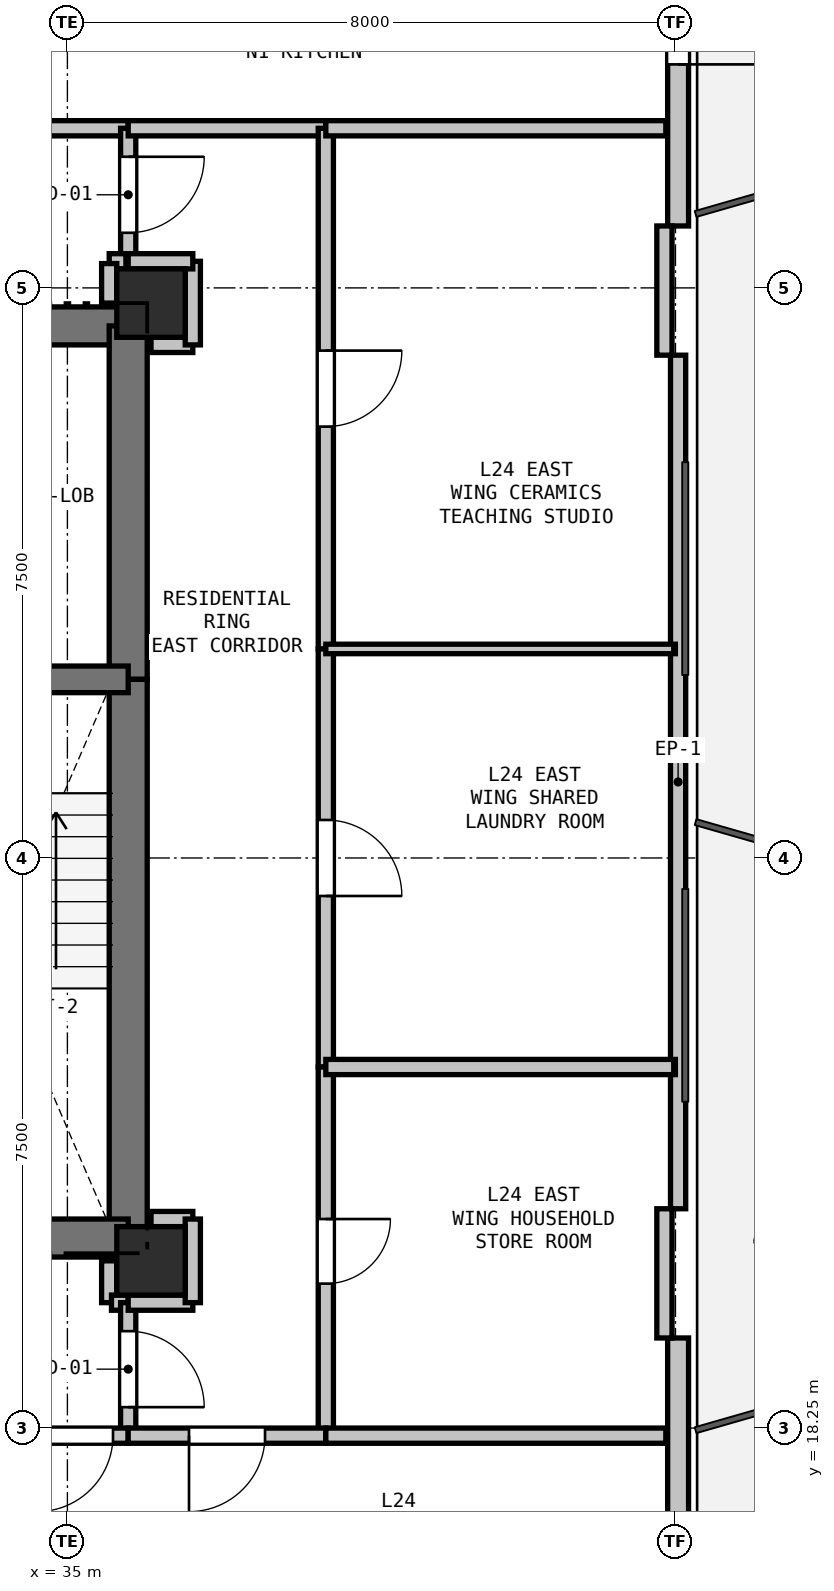
"""IFC4 building model, lengths in metres.
Left out: names, types, materials, properties, quantities, classifications, styles, units other than length and angle.
Written with IfcOpenShell. Run it as: python <this file> out.ifc"""

import sys

from ifc_helpers import new_model, si_unit, direction, frame, frame_2d, origin, origin_2d, place, context, subcontext, project, spatial, rectangle, extrude, element, fill, save


model = new_model("IFC4")
c1 = context("Model", 3, precision=1e-05, world=origin(), true_north=direction((0.0, 1.0)))
c2 = subcontext(c1, "Body", "Model", "MODEL_VIEW")
j1 = project(units=[si_unit("LENGTHUNIT", "METRE"), si_unit("PLANEANGLEUNIT", "RADIAN")], contexts=[c1])
p1 = place(None, origin())
s1 = spatial("IfcSite", under=j1, at=p1, CompositionType="ELEMENT")
p2 = place(p1, origin())
s2 = spatial("IfcBuilding", under=s1, at=p2, CompositionType="ELEMENT")
p3 = place(p2, frame((0.0, 0.0, 90.0)))
s3 = spatial("IfcBuildingStorey", under=s2, at=p3, CompositionType="ELEMENT", Elevation=90.0)
for number, where, z_axis, x_axis in (
    (1, (36.1, 33.05, 0.0), (0.0, 0.0, 1.0), (1.0, 0.0, 0.0)),
    (2, (36.1, 20.45, 0.0), (0.0, 0.0, 1.0), (1.0, 0.0, 0.0)),
):
    element("IfcColumn", number, at=place(p3, frame(where, z_axis=z_axis, x_axis=x_axis)), inside=s3, PredefinedType="COLUMN", context=c2, shape_type="SweptSolid", body=[
        extrude(rectangle(XDim=0.9, YDim=0.9, at=origin_2d()), origin(), (0.0, 0.0, 1.0), 3.3),
    ])
p4 = place(p3, frame((43.035, 45.994, 0.0), z_axis=(0.0, 0.0, 1.0), x_axis=(0.0, -1.0, 0.0)))
e3 = element("IfcWall", 3, at=p4, inside=s3, PredefinedType="SOLIDWALL", context=c2, shape_type="SweptSolid", body=[
    extrude(rectangle(XDim=11.93, YDim=0.275, at=frame_2d((5.965, 0.0))), origin(), (0.0, 0.0, 1.0), 2.67),
])
p5 = place(p4, frame((8.704, 0.0, 0.0)))
e4 = element("IfcOpeningElement", 4, at=p5, cuts=e3, PredefinedType="OPENING", context=c2, shape_type="SweptSolid", body=[
    extrude(rectangle(XDim=1.1, YDim=2.1, at=frame_2d((0.55, 1.05))), frame((0.0, 0.147, 0.0), z_axis=(0.0, -1.0, 0.0), x_axis=(1.0, 0.0, 0.0)), (0.0, 0.0, 1.0), 0.295),
])
p6 = place(p3, frame((43.035, 32.365, 0.0), z_axis=(0.0, 0.0, 1.0), x_axis=(0.0, -1.0, 0.0)))
e5 = element("IfcWall", 5, at=p6, inside=s3, PredefinedType="PARAPET", context=c2, shape_type="SweptSolid", body=[
    extrude(rectangle(XDim=11.229, YDim=0.2, at=frame_2d((5.615, 0.0))), origin(), (0.0, 0.0, 1.0), 0.2),
])
p7 = place(p3, frame((43.035, 19.435, 0.0), z_axis=(0.0, 0.0, 1.0), x_axis=(0.0, -1.0, 0.0)))
e6 = element("IfcWall", 6, at=p7, inside=s3, PredefinedType="SOLIDWALL", context=c2, shape_type="SweptSolid", body=[
    extrude(rectangle(XDim=11.93, YDim=0.275, at=frame_2d((5.965, 0.0))), origin(), (0.0, 0.0, 1.0), 2.67),
])
p8 = place(p7, frame((9.726, 0.0, 0.9)))
e7 = element("IfcOpeningElement", 7, at=p8, cuts=e6, PredefinedType="OPENING", context=c2, shape_type="SweptSolid", body=[
    extrude(rectangle(XDim=1.2, YDim=1.4, at=frame_2d((0.6, 0.7))), frame((0.0, 0.147, 0.0), z_axis=(0.0, -1.0, 0.0), x_axis=(1.0, 0.0, 0.0)), (0.0, 0.0, 1.0), 0.295),
])
for number, where, z_axis, x_axis in (
    (8, (42.854, 34.065, 0.0), (0.0, 0.0, 1.0), (0.0, -1.0, 0.0)),
    (9, (42.854, 21.135, 0.0), (0.0, 0.0, 1.0), (0.0, -1.0, 0.0)),
):
    element("IfcWall", number, at=place(p3, frame(where, z_axis=z_axis, x_axis=x_axis)), inside=s3, PredefinedType="PARAPET", context=c2, shape_type="SweptSolid", body=[
        extrude(rectangle(XDim=1.7, YDim=0.2, at=frame_2d((0.85, 0.0))), origin(), (0.0, 0.0, 1.0), 2.67),
    ])
p9 = place(p3, frame((32.35, 32.75, 0.0), z_axis=(0.0, 0.0, 1.0), x_axis=(1.0, 0.0, 0.0)))
e10 = element("IfcWall", 10, at=p9, inside=s3, PredefinedType="SHEAR", context=c2, shape_type="SweptSolid", body=[
    extrude(rectangle(XDim=3.45, YDim=0.5, at=frame_2d((1.725, 0.0))), origin(), (0.0, 0.0, 1.0), 3.05),
])
p10 = place(p9, frame((0.65, 0.0, 0.0)))
e11 = element("IfcOpeningElement", 11, at=p10, cuts=e10, PredefinedType="OPENING", context=c2, shape_type="SweptSolid", body=[
    extrude(rectangle(XDim=1.15, YDim=2.15, at=frame_2d((0.575, 1.075))), frame((0.0, 0.26, 0.0), z_axis=(0.0, -1.0, 0.0), x_axis=(1.0, 0.0, 0.0)), (0.0, 0.0, 1.0), 0.52),
])
p11 = place(p3, frame((35.8, 32.75, 0.0), z_axis=(0.0, 0.0, 1.0), x_axis=(0.0, -1.0, 0.0)))
e12 = element("IfcWall", 12, at=p11, inside=s3, PredefinedType="SHEAR", context=c2, shape_type="SweptSolid", body=[
    extrude(rectangle(XDim=4.65, YDim=0.5, at=frame_2d((2.325, 0.0))), origin(), (0.0, 0.0, 1.0), 3.05),
])
p12 = place(p3, frame((35.8, 28.1, 0.0), z_axis=(0.0, 0.0, 1.0), x_axis=(0.0, -1.0, 0.0)))
e13 = element("IfcWall", 13, at=p12, inside=s3, PredefinedType="SHEAR", context=c2, shape_type="SweptSolid", body=[
    extrude(rectangle(XDim=7.35, YDim=0.5, at=frame_2d((3.675, 0.0))), origin(), (0.0, 0.0, 1.0), 3.05),
])
p13 = place(p3, frame((35.8, 20.75, 0.0), z_axis=(0.0, 0.0, 1.0), x_axis=(-1.0, 0.0, 0.0)))
e14 = element("IfcWall", 14, at=p13, inside=s3, PredefinedType="SHEAR", context=c2, shape_type="SweptSolid", body=[
    extrude(rectangle(XDim=3.45, YDim=0.5, at=frame_2d((1.725, 0.0))), origin(), (0.0, 0.0, 1.0), 3.05),
])
p14 = place(p3, frame((32.35, 28.1, 0.0), z_axis=(0.0, 0.0, 1.0), x_axis=(1.0, 0.0, 0.0)))
e15 = element("IfcWall", 15, at=p14, inside=s3, PredefinedType="SHEAR", context=c2, shape_type="SweptSolid", body=[
    extrude(rectangle(XDim=3.45, YDim=0.35, at=frame_2d((1.725, 0.0))), origin(), (0.0, 0.0, 1.0), 3.05),
])
p15 = place(p14, frame((1.15, 0.0, 0.0)))
e16 = element("IfcOpeningElement", 16, at=p15, cuts=e15, PredefinedType="OPENING", context=c2, shape_type="SweptSolid", body=[
    extrude(rectangle(XDim=1.15, YDim=2.15, at=frame_2d((0.575, 1.075))), frame((0.0, 0.185, 0.0), z_axis=(0.0, -1.0, 0.0), x_axis=(1.0, 0.0, 0.0)), (0.0, 0.0, 1.0), 0.37),
])
p16 = place(p3, frame((35.55, 20.45, 0.0), z_axis=(0.0, 0.0, 1.0), x_axis=(0.0, -1.0, 0.0)))
e17 = element("IfcWall", 17, at=p16, inside=s3, PredefinedType="PARTITIONING", context=c2, shape_type="SweptSolid", body=[
    extrude(rectangle(XDim=0.55, YDim=0.2, at=frame_2d((0.275, 0.0))), origin(), (0.0, 0.0, 1.0), 2.498),
])
p17 = place(p3, frame((35.58, 19.9, 0.0), z_axis=(0.0, 0.0, 1.0), x_axis=(1.0, 0.0, 0.0)))
e18 = element("IfcWall", 18, at=p17, inside=s3, PredefinedType="PARTITIONING", context=c2, shape_type="SweptSolid", body=[
    extrude(rectangle(XDim=0.22, YDim=0.2, at=frame_2d((0.11, 0.0))), origin(), (0.0, 0.0, 1.0), 3.05),
])
p18 = place(p3, frame((35.8, 19.9, 0.0), z_axis=(0.0, 0.0, 1.0), x_axis=(0.0, -1.0, 0.0)))
e19 = element("IfcWall", 19, at=p18, inside=s3, PredefinedType="PARTITIONING", context=c2, shape_type="SweptSolid", body=[
    extrude(rectangle(XDim=1.75, YDim=0.2, at=frame_2d((0.875, 0.0))), origin(), (0.0, 0.0, 1.0), 3.05),
])
p19 = place(p18, frame((0.375, 0.0, 0.0)))
e20 = element("IfcOpeningElement", 20, at=p19, cuts=e19, PredefinedType="OPENING", context=c2, shape_type="SweptSolid", body=[
    extrude(rectangle(XDim=1.0, YDim=2.15, at=frame_2d((0.5, 1.075))), frame((0.0, 0.11, 0.0), z_axis=(0.0, -1.0, 0.0), x_axis=(1.0, 0.0, 0.0)), (0.0, 0.0, 1.0), 0.22),
])
p20 = place(p3, frame((35.8, 18.15, 0.0), z_axis=(0.0, 0.0, 1.0), x_axis=(-1.0, 0.0, 0.0)))
e21 = element("IfcWall", 21, at=p20, inside=s3, PredefinedType="PARTITIONING", context=c2, shape_type="SweptSolid", body=[
    extrude(rectangle(XDim=1.4, YDim=0.2, at=frame_2d((0.7, 0.0))), origin(), (0.0, 0.0, 1.0), 3.05),
])
p21 = place(p20, frame((0.2, 0.0, 0.0)))
e22 = element("IfcOpeningElement", 22, at=p21, cuts=e21, PredefinedType="OPENING", context=c2, shape_type="SweptSolid", body=[
    extrude(rectangle(XDim=1.0, YDim=2.15, at=frame_2d((0.5, 1.075))), frame((0.0, 0.11, 0.0), z_axis=(0.0, -1.0, 0.0), x_axis=(1.0, 0.0, 0.0)), (0.0, 0.0, 1.0), 0.22),
])
p22 = place(p3, frame((33.2, 35.35, 0.0), z_axis=(0.0, 0.0, 1.0), x_axis=(1.0, 0.0, 0.0)))
e23 = element("IfcWall", 23, at=p22, inside=s3, PredefinedType="PARTITIONING", context=c2, shape_type="SweptSolid", body=[
    extrude(rectangle(XDim=2.6, YDim=0.2, at=frame_2d((1.3, 0.0))), origin(), (0.0, 0.0, 1.0), 3.05),
])
p23 = place(p3, frame((35.8, 35.35, 0.0), z_axis=(0.0, 0.0, 1.0), x_axis=(0.0, -1.0, 0.0)))
e24 = element("IfcWall", 24, at=p23, inside=s3, PredefinedType="PARTITIONING", context=c2, shape_type="SweptSolid", body=[
    extrude(rectangle(XDim=1.75, YDim=0.2, at=frame_2d((0.875, 0.0))), origin(), (0.0, 0.0, 1.0), 3.05),
])
p24 = place(p23, frame((0.375, 0.0, 0.0)))
e25 = element("IfcOpeningElement", 25, at=p24, cuts=e24, PredefinedType="OPENING", context=c2, shape_type="SweptSolid", body=[
    extrude(rectangle(XDim=1.0, YDim=2.15, at=frame_2d((0.5, 1.075))), frame((0.0, 0.11, 0.0), z_axis=(0.0, -1.0, 0.0), x_axis=(1.0, 0.0, 0.0)), (0.0, 0.0, 1.0), 0.22),
])
p25 = place(p3, frame((35.77, 33.6, 0.0), z_axis=(0.0, 0.0, 1.0), x_axis=(-1.0, 0.0, 0.0)))
e26 = element("IfcWall", 26, at=p25, inside=s3, PredefinedType="PARTITIONING", context=c2, shape_type="SweptSolid", body=[
    extrude(rectangle(XDim=0.22, YDim=0.2, at=frame_2d((0.11, 0.0))), origin(), (0.0, 0.0, 1.0), 3.05),
])
p26 = place(p3, frame((35.55, 33.57, 0.0), z_axis=(0.0, 0.0, 1.0), x_axis=(0.0, -1.0, 0.0)))
e27 = element("IfcWall", 27, at=p26, inside=s3, PredefinedType="PARTITIONING", context=c2, shape_type="SweptSolid", body=[
    extrude(rectangle(XDim=0.52, YDim=0.2, at=frame_2d((0.26, 0.0))), origin(), (0.0, 0.0, 1.0), 2.498),
])
for number, where, z_axis, x_axis in (
    (28, (36.65, 21.0, 0.0), (0.0, 0.0, 1.0), (-1.0, 0.0, 0.0)),
    (29, (36.1, 32.5, 0.0), (0.0, 0.0, 1.0), (1.0, 0.0, 0.0)),
):
    element("IfcWall", number, at=place(p3, frame(where, z_axis=z_axis, x_axis=x_axis)), inside=s3, PredefinedType="PARTITIONING", context=c2, shape_type="SweptSolid", body=[
        extrude(rectangle(XDim=0.55, YDim=0.2, at=frame_2d((0.275, 0.0))), origin(), (0.0, 0.0, 1.0), 2.498),
    ])
p27 = place(p3, frame((36.65, 32.5, 0.0), z_axis=(0.0, 0.0, 1.0), x_axis=(0.0, 1.0, 0.0)))
e30 = element("IfcWall", 30, at=p27, inside=s3, PredefinedType="PARTITIONING", context=c2, shape_type="SweptSolid", body=[
    extrude(rectangle(XDim=1.1, YDim=0.2, at=frame_2d((0.55, 0.0))), origin(), (0.0, 0.0, 1.0), 2.423),
])
p28 = place(p3, frame((36.65, 33.6, 0.0), z_axis=(0.0, 0.0, 1.0), x_axis=(-1.0, 0.0, 0.0)))
e31 = element("IfcWall", 31, at=p28, inside=s3, PredefinedType="PARTITIONING", context=c2, shape_type="SweptSolid", body=[
    extrude(rectangle(XDim=0.85, YDim=0.2, at=frame_2d((0.425, 0.0))), origin(), (0.0, 0.0, 1.0), 2.423),
])
p29 = place(p3, frame((35.8, 35.35, 0.0), z_axis=(0.0, 0.0, 1.0), x_axis=(1.0, 0.0, 0.0)))
e32 = element("IfcWall", 32, at=p29, inside=s3, PredefinedType="PARTITIONING", context=c2, shape_type="SweptSolid", body=[
    extrude(rectangle(XDim=2.6, YDim=0.2, at=frame_2d((1.3, 0.0))), origin(), (0.0, 0.0, 1.0), 2.423),
])
p30 = place(p3, frame((38.4, 35.35, 0.0), z_axis=(0.0, 0.0, 1.0), x_axis=(0.0, -1.0, 0.0)))
e33 = element("IfcWall", 33, at=p30, inside=s3, PredefinedType="PARTITIONING", context=c2, shape_type="SweptSolid", body=[
    extrude(rectangle(XDim=6.85, YDim=0.2, at=frame_2d((3.425, 0.0))), origin(), (0.0, 0.0, 1.0), 3.05),
])
p31 = place(p30, frame((2.925, 0.0, 0.0)))
e34 = element("IfcOpeningElement", 34, at=p31, cuts=e33, PredefinedType="OPENING", context=c2, shape_type="SweptSolid", body=[
    extrude(rectangle(XDim=1.0, YDim=2.15, at=frame_2d((0.5, 1.075))), frame((0.0, 0.11, 0.0), z_axis=(0.0, -1.0, 0.0), x_axis=(1.0, 0.0, 0.0)), (0.0, 0.0, 1.0), 0.22),
])
p32 = place(p3, frame((38.4, 28.5, 0.0), z_axis=(0.0, 0.0, 1.0), x_axis=(0.0, -1.0, 0.0)))
e35 = element("IfcWall", 35, at=p32, inside=s3, PredefinedType="PARTITIONING", context=c2, shape_type="SweptSolid", body=[
    extrude(rectangle(XDim=5.5, YDim=0.2, at=frame_2d((2.75, 0.0))), origin(), (0.0, 0.0, 1.0), 3.05),
])
p33 = place(p32, frame((2.25, 0.0, 0.0)))
e36 = element("IfcOpeningElement", 36, at=p33, cuts=e35, PredefinedType="OPENING", context=c2, shape_type="SweptSolid", body=[
    extrude(rectangle(XDim=1.0, YDim=2.15, at=frame_2d((0.5, 1.075))), frame((0.0, 0.11, 0.0), z_axis=(0.0, -1.0, 0.0), x_axis=(1.0, 0.0, 0.0)), (0.0, 0.0, 1.0), 0.22),
])
p34 = place(p3, frame((38.4, 23.0, 0.0), z_axis=(0.0, 0.0, 1.0), x_axis=(0.0, -1.0, 0.0)))
e37 = element("IfcWall", 37, at=p34, inside=s3, PredefinedType="PARTITIONING", context=c2, shape_type="SweptSolid", body=[
    extrude(rectangle(XDim=4.85, YDim=0.2, at=frame_2d((2.425, 0.0))), origin(), (0.0, 0.0, 1.0), 3.05),
])
p35 = place(p34, frame((2.0, 0.0, 0.0)))
e38 = element("IfcOpeningElement", 38, at=p35, cuts=e37, PredefinedType="OPENING", context=c2, shape_type="SweptSolid", body=[
    extrude(rectangle(XDim=0.85, YDim=2.1, at=frame_2d((0.425, 1.05))), frame((0.0, 0.11, 0.0), z_axis=(0.0, -1.0, 0.0), x_axis=(1.0, 0.0, 0.0)), (0.0, 0.0, 1.0), 0.22),
])
p36 = place(p3, frame((38.4, 18.15, 0.0), z_axis=(0.0, 0.0, 1.0), x_axis=(-1.0, 0.0, 0.0)))
e39 = element("IfcWall", 39, at=p36, inside=s3, PredefinedType="PARTITIONING", context=c2, shape_type="SweptSolid", body=[
    extrude(rectangle(XDim=2.6, YDim=0.2, at=frame_2d((1.3, 0.0))), origin(), (0.0, 0.0, 1.0), 2.423),
])
p37 = place(p36, frame((0.8, 0.0, 0.0)))
e40 = element("IfcOpeningElement", 40, at=p37, cuts=e39, PredefinedType="OPENING", context=c2, shape_type="SweptSolid", body=[
    extrude(rectangle(XDim=1.0, YDim=2.15, at=frame_2d((0.5, 1.075))), frame((0.0, 0.11, 0.0), z_axis=(0.0, -1.0, 0.0), x_axis=(1.0, 0.0, 0.0)), (0.0, 0.0, 1.0), 0.22),
])
p38 = place(p3, frame((35.8, 19.9, 0.0), z_axis=(0.0, 0.0, 1.0), x_axis=(1.0, 0.0, 0.0)))
e41 = element("IfcWall", 41, at=p38, inside=s3, PredefinedType="PARTITIONING", context=c2, shape_type="SweptSolid", body=[
    extrude(rectangle(XDim=0.85, YDim=0.2, at=frame_2d((0.425, 0.0))), origin(), (0.0, 0.0, 1.0), 2.423),
])
p39 = place(p3, frame((36.65, 19.9, 0.0), z_axis=(0.0, 0.0, 1.0), x_axis=(0.0, 1.0, 0.0)))
e42 = element("IfcWall", 42, at=p39, inside=s3, PredefinedType="PARTITIONING", context=c2, shape_type="SweptSolid", body=[
    extrude(rectangle(XDim=1.1, YDim=0.2, at=frame_2d((0.55, 0.0))), origin(), (0.0, 0.0, 1.0), 3.05),
])
for number, where, z_axis, x_axis in (
    (43, (42.873, 35.35, 0.0), (0.0, 0.0, 1.0), (-1.0, 0.0, 0.0)),
    (44, (38.4, 18.15, 0.0), (0.0, 0.0, 1.0), (1.0, 0.0, 0.0)),
):
    element("IfcWall", number, at=place(p3, frame(where, z_axis=z_axis, x_axis=x_axis)), inside=s3, PredefinedType="PARTITIONING", context=c2, shape_type="SweptSolid", body=[
        extrude(rectangle(XDim=4.473, YDim=0.2, at=frame_2d((2.237, 0.0))), origin(), (0.0, 0.0, 1.0), 2.365),
    ])
p40 = place(p3, frame((42.999, 28.5, 0.0), z_axis=(0.0, 0.0, 1.0), x_axis=(-1.0, 0.0, 0.0)))
e45 = element("IfcWall", 45, at=p40, inside=s3, PredefinedType="PARTITIONING", context=c2, shape_type="SweptSolid", body=[
    extrude(rectangle(XDim=4.599, YDim=0.125, at=frame_2d((2.299, 0.0))), origin(), (0.0, 0.0, 1.0), 2.365),
])
p41 = place(p3, frame((42.999, 23.0, 0.0), z_axis=(0.0, 0.0, 1.0), x_axis=(-1.0, 0.0, 0.0)))
e46 = element("IfcWall", 46, at=p41, inside=s3, PredefinedType="PARTITIONING", context=c2, shape_type="SweptSolid", body=[
    extrude(rectangle(XDim=4.599, YDim=0.2, at=frame_2d((2.299, 0.0))), origin(), (0.0, 0.0, 1.0), 2.365),
])
p42 = place(p5, origin())
e47 = element("IfcDoor", 47, at=p42, inside=s3, OperationType="SINGLE_SWING_RIGHT", PredefinedType="DOOR", context=c2, shape_type="SweptSolid", body=[
    extrude(rectangle(XDim=1.1, YDim=2.1, at=frame_2d((0.55, 1.05))), frame((0.0, 0.025, 0.0), z_axis=(0.0, -1.0, 0.0), x_axis=(1.0, 0.0, 0.0)), (0.0, 0.0, 1.0), 0.05),
])
fill(e4, e47)
p43 = place(p19, origin())
e48 = element("IfcDoor", 48, at=p43, inside=s3, OperationType="SINGLE_SWING_RIGHT", PredefinedType="DOOR", context=c2, shape_type="SweptSolid", body=[
    extrude(rectangle(XDim=1.0, YDim=2.15, at=frame_2d((0.5, 1.075))), frame((0.0, 0.025, 0.0), z_axis=(0.0, -1.0, 0.0), x_axis=(1.0, 0.0, 0.0)), (0.0, 0.0, 1.0), 0.05),
])
fill(e20, e48)
p44 = place(p24, origin())
e49 = element("IfcDoor", 49, at=p44, inside=s3, OperationType="SINGLE_SWING_LEFT", PredefinedType="DOOR", context=c2, shape_type="SweptSolid", body=[
    extrude(rectangle(XDim=1.0, YDim=2.15, at=frame_2d((0.5, 1.075))), frame((0.0, 0.025, 0.0), z_axis=(0.0, -1.0, 0.0), x_axis=(1.0, 0.0, 0.0)), (0.0, 0.0, 1.0), 0.05),
])
fill(e25, e49)
p45 = place(p21, origin())
e50 = element("IfcDoor", 50, at=p45, inside=s3, OperationType="SINGLE_SWING_RIGHT", PredefinedType="DOOR", context=c2, shape_type="SweptSolid", body=[
    extrude(rectangle(XDim=1.0, YDim=2.15, at=frame_2d((0.5, 1.075))), frame((0.0, 0.025, 0.0), z_axis=(0.0, -1.0, 0.0), x_axis=(1.0, 0.0, 0.0)), (0.0, 0.0, 1.0), 0.05),
])
fill(e22, e50)
p46 = place(p37, origin())
e51 = element("IfcDoor", 51, at=p46, inside=s3, OperationType="SINGLE_SWING_RIGHT", PredefinedType="DOOR", context=c2, shape_type="SweptSolid", body=[
    extrude(rectangle(XDim=1.0, YDim=2.15, at=frame_2d((0.5, 1.075))), frame((0.0, 0.025, 0.0), z_axis=(0.0, -1.0, 0.0), x_axis=(1.0, 0.0, 0.0)), (0.0, 0.0, 1.0), 0.05),
])
fill(e40, e51)
p47 = place(p31, origin())
e52 = element("IfcDoor", 52, at=p47, inside=s3, OperationType="SINGLE_SWING_LEFT", PredefinedType="DOOR", context=c2, shape_type="SweptSolid", body=[
    extrude(rectangle(XDim=1.0, YDim=2.15, at=frame_2d((0.5, 1.075))), frame((0.0, 0.025, 0.0), z_axis=(0.0, -1.0, 0.0), x_axis=(1.0, 0.0, 0.0)), (0.0, 0.0, 1.0), 0.05),
])
fill(e34, e52)
p48 = place(p33, origin())
e53 = element("IfcDoor", 53, at=p48, inside=s3, OperationType="SINGLE_SWING_RIGHT", PredefinedType="DOOR", context=c2, shape_type="SweptSolid", body=[
    extrude(rectangle(XDim=1.0, YDim=2.15, at=frame_2d((0.5, 1.075))), frame((0.0, 0.025, 0.0), z_axis=(0.0, -1.0, 0.0), x_axis=(1.0, 0.0, 0.0)), (0.0, 0.0, 1.0), 0.05),
])
fill(e36, e53)
p49 = place(p35, origin())
e54 = element("IfcDoor", 54, at=p49, inside=s3, OperationType="SINGLE_SWING_LEFT", PredefinedType="DOOR", context=c2, shape_type="SweptSolid", body=[
    extrude(rectangle(XDim=0.85, YDim=2.1, at=frame_2d((0.425, 1.05))), frame((0.0, 0.025, 0.0), z_axis=(0.0, -1.0, 0.0), x_axis=(1.0, 0.0, 0.0)), (0.0, 0.0, 1.0), 0.05),
])
fill(e38, e54)
save(model, sys.argv[1])
